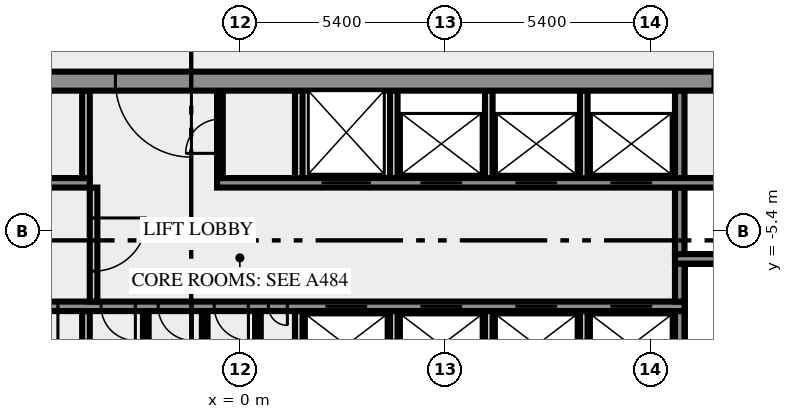
"""IFC4 building model, lengths in metres.
Left out: names, types, materials, properties, quantities, classifications, styles, units other than length and angle.
Written with IfcOpenShell. Run it as: python <this file> out.ifc"""

import sys

from ifc_helpers import new_model, si_unit, direction, frame, frame_2d, origin, place, context, subcontext, project, spatial, rectangle, extrude, element, fill, save


model = new_model("IFC4")
c1 = context("Model", 3, precision=1e-05, world=origin(), true_north=direction((0.0, 1.0)))
c2 = subcontext(c1, "Body", "Model", "MODEL_VIEW")
j1 = project(units=[si_unit("LENGTHUNIT", "METRE"), si_unit("PLANEANGLEUNIT", "RADIAN")], contexts=[c1])
p1 = place(None, origin())
s1 = spatial("IfcSite", under=j1, at=p1, CompositionType="ELEMENT")
p2 = place(p1, origin())
s2 = spatial("IfcBuilding", under=s1, at=p2, CompositionType="ELEMENT")
p3 = place(p2, frame((0.0, 0.0, 168.0)))
s3 = spatial("IfcBuildingStorey", under=s2, at=p3, CompositionType="ELEMENT", Elevation=168.0)
p4 = place(p3, frame((-4.05, -10.5, 0.0), z_axis=(0.0, 0.0, 1.0), x_axis=(0.0, 1.0, 0.0)))
e1 = element("IfcWall", 1, at=p4, inside=s3, PredefinedType="SOLIDWALL", context=c2, shape_type="SweptSolid", body=[
    extrude(rectangle(XDim=3.0, YDim=0.2, at=frame_2d((1.5, 0.0))), origin(), (0.0, 0.0, 1.0), 3.65),
])
for number, where, z_axis, x_axis in (
    (2, (-2.475, -10.5, 0.0), (0.0, 0.0, 1.0), (0.0, 1.0, 0.0)),
    (3, (-0.925, -10.5, 0.0), (0.0, 0.0, 1.0), (0.0, 1.0, 0.0)),
    (4, (0.475, -10.5, 0.0), (0.0, 0.0, 1.0), (0.0, 1.0, 0.0)),
):
    element("IfcWall", number, at=place(p3, frame(where, z_axis=z_axis, x_axis=x_axis)), inside=s3, PredefinedType="PARTITIONING", context=c2, shape_type="SweptSolid", body=[
        extrude(rectangle(XDim=3.0, YDim=0.15, at=frame_2d((1.5, 0.0))), origin(), (0.0, 0.0, 1.0), 3.65),
    ])
for number, where, z_axis, x_axis in (
    (5, (1.55, -10.5, 0.0), (0.0, 0.0, 1.0), (0.0, 1.0, 0.0)),
    (6, (4.05, -10.5, 0.0), (0.0, 0.0, 1.0), (0.0, 1.0, 0.0)),
    (7, (6.55, -10.5, 0.0), (0.0, 0.0, 1.0), (0.0, 1.0, 0.0)),
    (8, (9.05, -10.5, 0.0), (0.0, 0.0, 1.0), (0.0, 1.0, 0.0)),
):
    element("IfcWall", number, at=place(p3, frame(where, z_axis=z_axis, x_axis=x_axis)), inside=s3, PredefinedType="SOLIDWALL", context=c2, shape_type="SweptSolid", body=[
        extrude(rectangle(XDim=3.0, YDim=0.2, at=frame_2d((1.5, 0.0))), origin(), (0.0, 0.0, 1.0), 3.65),
    ])
p5 = place(p3, frame((11.575, -10.5, 0.0), z_axis=(0.0, 0.0, 1.0), x_axis=(0.0, 1.0, 0.0)))
e9 = element("IfcWall", 9, at=p5, inside=s3, PredefinedType="SHEAR", context=c2, shape_type="SweptSolid", body=[
    extrude(rectangle(XDim=3.0, YDim=0.25, at=frame_2d((1.5, 0.0))), origin(), (0.0, 0.0, 1.0), 3.65),
])
p6 = place(p3, frame((11.7, -7.375, 0.0), z_axis=(0.0, 0.0, 1.0), x_axis=(-1.0, 0.0, 0.0)))
e10 = element("IfcWall", 10, at=p6, inside=s3, PredefinedType="SHEAR", context=c2, shape_type="SweptSolid", body=[
    extrude(rectangle(XDim=23.4, YDim=0.25, at=frame_2d((11.7, 0.0))), origin(), (0.0, 0.0, 1.0), 3.65),
])
p7 = place(p6, frame((20.213, 0.0, 0.0)))
e11 = element("IfcOpeningElement", 11, at=p7, cuts=e10, PredefinedType="OPENING", context=c2, shape_type="SweptSolid", body=[
    extrude(rectangle(XDim=0.9, YDim=2.1, at=frame_2d((0.45, 1.05))), frame((0.0, 0.135, 0.0), z_axis=(0.0, -1.0, 0.0), x_axis=(1.0, 0.0, 0.0)), (0.0, 0.0, 1.0), 0.27),
])
p8 = place(p6, frame((16.488, 0.0, 0.0)))
e12 = element("IfcOpeningElement", 12, at=p8, cuts=e10, PredefinedType="OPENING", context=c2, shape_type="SweptSolid", body=[
    extrude(rectangle(XDim=0.9, YDim=2.1, at=frame_2d((0.45, 1.05))), frame((0.0, 0.135, 0.0), z_axis=(0.0, -1.0, 0.0), x_axis=(1.0, 0.0, 0.0)), (0.0, 0.0, 1.0), 0.27),
])
p9 = place(p6, frame((14.45, 0.0, 0.0)))
e13 = element("IfcOpeningElement", 13, at=p9, cuts=e10, PredefinedType="OPENING", context=c2, shape_type="SweptSolid", body=[
    extrude(rectangle(XDim=0.9, YDim=2.1, at=frame_2d((0.45, 1.05))), frame((0.0, 0.135, 0.0), z_axis=(0.0, -1.0, 0.0), x_axis=(1.0, 0.0, 0.0)), (0.0, 0.0, 1.0), 0.27),
])
p10 = place(p6, frame((12.95, 0.0, 0.0)))
e14 = element("IfcOpeningElement", 14, at=p10, cuts=e10, PredefinedType="OPENING", context=c2, shape_type="SweptSolid", body=[
    extrude(rectangle(XDim=0.9, YDim=2.1, at=frame_2d((0.45, 1.05))), frame((0.0, 0.135, 0.0), z_axis=(0.0, -1.0, 0.0), x_axis=(1.0, 0.0, 0.0)), (0.0, 0.0, 1.0), 0.27),
])
p11 = place(p6, frame((11.475, 0.0, 0.0)))
e15 = element("IfcOpeningElement", 15, at=p11, cuts=e10, PredefinedType="OPENING", context=c2, shape_type="SweptSolid", body=[
    extrude(rectangle(XDim=0.9, YDim=2.1, at=frame_2d((0.45, 1.05))), frame((0.0, 0.135, 0.0), z_axis=(0.0, -1.0, 0.0), x_axis=(1.0, 0.0, 0.0)), (0.0, 0.0, 1.0), 0.27),
])
p12 = place(p6, frame((10.45, 0.0, 0.0)))
e16 = element("IfcOpeningElement", 16, at=p12, cuts=e10, PredefinedType="OPENING", context=c2, shape_type="SweptSolid", body=[
    extrude(rectangle(XDim=0.5, YDim=2.1, at=frame_2d((0.25, 1.05))), frame((0.0, 0.135, 0.0), z_axis=(0.0, -1.0, 0.0), x_axis=(1.0, 0.0, 0.0)), (0.0, 0.0, 1.0), 0.27),
])
p13 = place(p6, frame((8.35, 0.0, 0.0)))
e17 = element("IfcOpeningElement", 17, at=p13, cuts=e10, PredefinedType="OPENING", context=c2, shape_type="SweptSolid", body=[
    extrude(rectangle(XDim=1.1, YDim=2.1, at=frame_2d((0.55, 1.05))), frame((0.0, 0.135, 0.0), z_axis=(0.0, -1.0, 0.0), x_axis=(1.0, 0.0, 0.0)), (0.0, 0.0, 1.0), 0.27),
])
p14 = place(p6, frame((5.85, 0.0, 0.0)))
e18 = element("IfcOpeningElement", 18, at=p14, cuts=e10, PredefinedType="OPENING", context=c2, shape_type="SweptSolid", body=[
    extrude(rectangle(XDim=1.1, YDim=2.1, at=frame_2d((0.55, 1.05))), frame((0.0, 0.135, 0.0), z_axis=(0.0, -1.0, 0.0), x_axis=(1.0, 0.0, 0.0)), (0.0, 0.0, 1.0), 0.27),
])
p15 = place(p6, frame((3.35, 0.0, 0.0)))
e19 = element("IfcOpeningElement", 19, at=p15, cuts=e10, PredefinedType="OPENING", context=c2, shape_type="SweptSolid", body=[
    extrude(rectangle(XDim=1.1, YDim=2.1, at=frame_2d((0.55, 1.05))), frame((0.0, 0.135, 0.0), z_axis=(0.0, -1.0, 0.0), x_axis=(1.0, 0.0, 0.0)), (0.0, 0.0, 1.0), 0.27),
])
p16 = place(p6, frame((0.85, 0.0, 0.0)))
e20 = element("IfcOpeningElement", 20, at=p16, cuts=e10, PredefinedType="OPENING", context=c2, shape_type="SweptSolid", body=[
    extrude(rectangle(XDim=1.1, YDim=2.1, at=frame_2d((0.55, 1.05))), frame((0.0, 0.135, 0.0), z_axis=(0.0, -1.0, 0.0), x_axis=(1.0, 0.0, 0.0)), (0.0, 0.0, 1.0), 0.27),
])
p17 = place(p3, frame((-3.85, -4.25, 0.0), z_axis=(0.0, 0.0, 1.0), x_axis=(0.0, -1.0, 0.0)))
e21 = element("IfcWall", 21, at=p17, inside=s3, PredefinedType="SOLIDWALL", context=c2, shape_type="SweptSolid", body=[
    extrude(rectangle(XDim=3.0, YDim=0.2, at=frame_2d((1.5, 0.0))), origin(), (0.0, 0.0, 1.0), 3.65),
])
p18 = place(p17, frame((0.8, 0.0, 0.0)))
e22 = element("IfcOpeningElement", 22, at=p18, cuts=e21, PredefinedType="OPENING", context=c2, shape_type="SweptSolid", body=[
    extrude(rectangle(XDim=1.4, YDim=2.1, at=frame_2d((0.7, 1.05))), frame((0.0, 0.11, 0.0), z_axis=(0.0, -1.0, 0.0), x_axis=(1.0, 0.0, 0.0)), (0.0, 0.0, 1.0), 0.22),
])
p19 = place(p3, frame((11.575, -7.25, 0.0), z_axis=(0.0, 0.0, 1.0), x_axis=(0.0, 1.0, 0.0)))
e23 = element("IfcWall", 23, at=p19, inside=s3, PredefinedType="SHEAR", context=c2, shape_type="SweptSolid", body=[
    extrude(rectangle(XDim=1.0, YDim=0.25, at=frame_2d((0.5, 0.0))), origin(), (0.0, 0.0, 1.0), 3.65),
])
p20 = place(p3, frame((19.5, -6.125, 0.0), z_axis=(0.0, 0.0, 1.0), x_axis=(-1.0, 0.0, 0.0)))
e24 = element("IfcWall", 24, at=p20, inside=s3, PredefinedType="SHEAR", context=c2, shape_type="SweptSolid", body=[
    extrude(rectangle(XDim=8.05, YDim=0.25, at=frame_2d((4.025, 0.0))), origin(), (0.0, 0.0, 1.0), 3.65),
])
p21 = place(p20, frame((0.05, 0.0, 0.0)))
e25 = element("IfcOpeningElement", 25, at=p21, cuts=e24, PredefinedType="OPENING", context=c2, shape_type="SweptSolid", body=[
    extrude(rectangle(XDim=1.8, YDim=2.1, at=frame_2d((0.9, 1.05))), frame((0.0, 0.135, 0.0), z_axis=(0.0, -1.0, 0.0), x_axis=(1.0, 0.0, 0.0)), (0.0, 0.0, 1.0), 0.27),
])
p22 = place(p3, frame((11.575, -6.0, 0.0), z_axis=(0.0, 0.0, 1.0), x_axis=(0.0, 1.0, 0.0)))
e26 = element("IfcWall", 26, at=p22, inside=s3, PredefinedType="SHEAR", context=c2, shape_type="SweptSolid", body=[
    extrude(rectangle(XDim=1.75, YDim=0.25, at=frame_2d((0.875, 0.0))), origin(), (0.0, 0.0, 1.0), 3.65),
])
p23 = place(p3, frame((-14.35, -4.125, 0.0), z_axis=(0.0, 0.0, 1.0), x_axis=(1.0, 0.0, 0.0)))
e27 = element("IfcWall", 27, at=p23, inside=s3, PredefinedType="SHEAR", context=c2, shape_type="SweptSolid", body=[
    extrude(rectangle(XDim=10.4, YDim=0.25, at=frame_2d((5.2, 0.0))), origin(), (0.0, 0.0, 1.0), 3.65),
])
p24 = place(p3, frame((-0.6, -4.125, 0.0), z_axis=(0.0, 0.0, 1.0), x_axis=(1.0, 0.0, 0.0)))
e28 = element("IfcWall", 28, at=p24, inside=s3, PredefinedType="SHEAR", context=c2, shape_type="SweptSolid", body=[
    extrude(rectangle(XDim=14.95, YDim=0.25, at=frame_2d((7.475, 0.0))), origin(), (0.0, 0.0, 1.0), 3.65),
])
p25 = place(p24, frame((2.75, 0.0, 0.0)))
e29 = element("IfcOpeningElement", 29, at=p25, cuts=e28, PredefinedType="OPENING", context=c2, shape_type="SweptSolid", body=[
    extrude(rectangle(XDim=1.3, YDim=2.1, at=frame_2d((0.65, 1.05))), frame((0.0, 0.135, 0.0), z_axis=(0.0, -1.0, 0.0), x_axis=(1.0, 0.0, 0.0)), (0.0, 0.0, 1.0), 0.27),
])
p26 = place(p24, frame((5.35, 0.0, 0.0)))
e30 = element("IfcOpeningElement", 30, at=p26, cuts=e28, PredefinedType="OPENING", context=c2, shape_type="SweptSolid", body=[
    extrude(rectangle(XDim=1.1, YDim=2.1, at=frame_2d((0.55, 1.05))), frame((0.0, 0.135, 0.0), z_axis=(0.0, -1.0, 0.0), x_axis=(1.0, 0.0, 0.0)), (0.0, 0.0, 1.0), 0.27),
])
p27 = place(p24, frame((7.85, 0.0, 0.0)))
e31 = element("IfcOpeningElement", 31, at=p27, cuts=e28, PredefinedType="OPENING", context=c2, shape_type="SweptSolid", body=[
    extrude(rectangle(XDim=1.1, YDim=2.1, at=frame_2d((0.55, 1.05))), frame((0.0, 0.135, 0.0), z_axis=(0.0, -1.0, 0.0), x_axis=(1.0, 0.0, 0.0)), (0.0, 0.0, 1.0), 0.27),
])
p28 = place(p24, frame((10.35, 0.0, 0.0)))
e32 = element("IfcOpeningElement", 32, at=p28, cuts=e28, PredefinedType="OPENING", context=c2, shape_type="SweptSolid", body=[
    extrude(rectangle(XDim=1.1, YDim=2.1, at=frame_2d((0.55, 1.05))), frame((0.0, 0.135, 0.0), z_axis=(0.0, -1.0, 0.0), x_axis=(1.0, 0.0, 0.0)), (0.0, 0.0, 1.0), 0.27),
])
p29 = place(p3, frame((-4.05, -4.0, 0.0), z_axis=(0.0, 0.0, 1.0), x_axis=(0.0, 1.0, 0.0)))
e33 = element("IfcWall", 33, at=p29, inside=s3, PredefinedType="SOLIDWALL", context=c2, shape_type="SweptSolid", body=[
    extrude(rectangle(XDim=2.3, YDim=0.2, at=frame_2d((1.15, 0.0))), origin(), (0.0, 0.0, 1.0), 3.65),
])
p30 = place(p3, frame((-0.525, -4.0, 0.0), z_axis=(0.0, 0.0, 1.0), x_axis=(0.0, 1.0, 0.0)))
e34 = element("IfcWall", 34, at=p30, inside=s3, PredefinedType="PARTITIONING", context=c2, shape_type="SweptSolid", body=[
    extrude(rectangle(XDim=2.3, YDim=0.15, at=frame_2d((1.15, 0.0))), origin(), (0.0, 0.0, 1.0), 3.65),
])
p31 = place(p30, frame((0.65, 0.0, 0.0)))
e35 = element("IfcOpeningElement", 35, at=p31, cuts=e34, PredefinedType="OPENING", context=c2, shape_type="SweptSolid", body=[
    extrude(rectangle(XDim=0.9, YDim=2.1, at=frame_2d((0.45, 1.05))), frame((0.0, 0.085, 0.0), z_axis=(0.0, -1.0, 0.0), x_axis=(1.0, 0.0, 0.0)), (0.0, 0.0, 1.0), 0.17),
])
for number, where, z_axis, x_axis in (
    (36, (1.55, -4.0, 0.0), (0.0, 0.0, 1.0), (0.0, 1.0, 0.0)),
    (37, (4.05, -4.0, 0.0), (0.0, 0.0, 1.0), (0.0, 1.0, 0.0)),
    (38, (6.55, -4.0, 0.0), (0.0, 0.0, 1.0), (0.0, 1.0, 0.0)),
    (39, (9.05, -4.0, 0.0), (0.0, 0.0, 1.0), (0.0, 1.0, 0.0)),
):
    element("IfcWall", number, at=place(p3, frame(where, z_axis=z_axis, x_axis=x_axis)), inside=s3, PredefinedType="SOLIDWALL", context=c2, shape_type="SweptSolid", body=[
        extrude(rectangle(XDim=2.3, YDim=0.2, at=frame_2d((1.15, 0.0))), origin(), (0.0, 0.0, 1.0), 3.65),
    ])
p32 = place(p3, frame((11.575, -4.0, 0.0), z_axis=(0.0, 0.0, 1.0), x_axis=(0.0, 1.0, 0.0)))
e40 = element("IfcWall", 40, at=p32, inside=s3, PredefinedType="SHEAR", context=c2, shape_type="SweptSolid", body=[
    extrude(rectangle(XDim=2.3, YDim=0.25, at=frame_2d((1.15, 0.0))), origin(), (0.0, 0.0, 1.0), 3.65),
])
p33 = place(p3, frame((20.49, -1.45, 0.0), z_axis=(0.0, 0.0, 1.0), x_axis=(-1.0, 0.0, 0.0)))
e41 = element("IfcWall", 41, at=p33, inside=s3, PredefinedType="SHEAR", context=c2, shape_type="SweptSolid", body=[
    extrude(rectangle(XDim=40.98, YDim=0.5, at=frame_2d((20.49, 0.0))), origin(), (0.0, 0.0, 1.0), 3.65),
])
p34 = place(p33, frame((38.14, 0.0, 0.0)))
e42 = element("IfcOpeningElement", 42, at=p34, cuts=e41, PredefinedType="OPENING", context=c2, shape_type="SweptSolid", body=[
    extrude(rectangle(XDim=1.8, YDim=2.1, at=frame_2d((0.9, 1.05))), frame((0.0, 0.26, 0.0), z_axis=(0.0, -1.0, 0.0), x_axis=(1.0, 0.0, 0.0)), (0.0, 0.0, 1.0), 0.52),
])
p35 = place(p33, frame((36.728, 0.0, 0.0)))
e43 = element("IfcOpeningElement", 43, at=p35, cuts=e41, PredefinedType="OPENING", context=c2, shape_type="SweptSolid", body=[
    extrude(rectangle(XDim=0.8, YDim=2.1, at=frame_2d((0.4, 1.05))), frame((0.0, 0.26, 0.0), z_axis=(0.0, -1.0, 0.0), x_axis=(1.0, 0.0, 0.0)), (0.0, 0.0, 1.0), 0.52),
])
p36 = place(p33, frame((35.153, 0.0, 0.0)))
e44 = element("IfcOpeningElement", 44, at=p36, cuts=e41, PredefinedType="OPENING", context=c2, shape_type="SweptSolid", body=[
    extrude(rectangle(XDim=0.8, YDim=2.1, at=frame_2d((0.4, 1.05))), frame((0.0, 0.26, 0.0), z_axis=(0.0, -1.0, 0.0), x_axis=(1.0, 0.0, 0.0)), (0.0, 0.0, 1.0), 0.52),
])
p37 = place(p33, frame((32.94, 0.0, 0.0)))
e45 = element("IfcOpeningElement", 45, at=p37, cuts=e41, PredefinedType="OPENING", context=c2, shape_type="SweptSolid", body=[
    extrude(rectangle(XDim=0.9, YDim=2.1, at=frame_2d((0.45, 1.05))), frame((0.0, 0.26, 0.0), z_axis=(0.0, -1.0, 0.0), x_axis=(1.0, 0.0, 0.0)), (0.0, 0.0, 1.0), 0.52),
])
p38 = place(p33, frame((27.84, 0.0, 0.0)))
e46 = element("IfcOpeningElement", 46, at=p38, cuts=e41, PredefinedType="OPENING", context=c2, shape_type="SweptSolid", body=[
    extrude(rectangle(XDim=0.9, YDim=2.1, at=frame_2d((0.45, 1.05))), frame((0.0, 0.26, 0.0), z_axis=(0.0, -1.0, 0.0), x_axis=(1.0, 0.0, 0.0)), (0.0, 0.0, 1.0), 0.52),
])
p39 = place(p33, frame((21.765, 0.0, 0.0)))
e47 = element("IfcOpeningElement", 47, at=p39, cuts=e41, PredefinedType="OPENING", context=c2, shape_type="SweptSolid", body=[
    extrude(rectangle(XDim=2.0, YDim=2.1, at=frame_2d((1.0, 1.05))), frame((0.0, 0.26, 0.0), z_axis=(0.0, -1.0, 0.0), x_axis=(1.0, 0.0, 0.0)), (0.0, 0.0, 1.0), 0.52),
])
p40 = place(p33, frame((7.14, 0.0, 0.0)))
e48 = element("IfcOpeningElement", 48, at=p40, cuts=e41, PredefinedType="OPENING", context=c2, shape_type="SweptSolid", body=[
    extrude(rectangle(XDim=0.9, YDim=2.1, at=frame_2d((0.45, 1.05))), frame((0.0, 0.26, 0.0), z_axis=(0.0, -1.0, 0.0), x_axis=(1.0, 0.0, 0.0)), (0.0, 0.0, 1.0), 0.52),
])
p41 = place(p33, frame((4.19, 0.0, 0.0)))
e49 = element("IfcOpeningElement", 49, at=p41, cuts=e41, PredefinedType="OPENING", context=c2, shape_type="SweptSolid", body=[
    extrude(rectangle(XDim=0.9, YDim=2.1, at=frame_2d((0.45, 1.05))), frame((0.0, 0.26, 0.0), z_axis=(0.0, -1.0, 0.0), x_axis=(1.0, 0.0, 0.0)), (0.0, 0.0, 1.0), 0.52),
])
p42 = place(p33, frame((1.04, 0.0, 0.0)))
e50 = element("IfcOpeningElement", 50, at=p42, cuts=e41, PredefinedType="OPENING", context=c2, shape_type="SweptSolid", body=[
    extrude(rectangle(XDim=1.8, YDim=2.1, at=frame_2d((0.9, 1.05))), frame((0.0, 0.26, 0.0), z_axis=(0.0, -1.0, 0.0), x_axis=(1.0, 0.0, 0.0)), (0.0, 0.0, 1.0), 0.52),
])
p43 = place(p8, origin())
e51 = element("IfcDoor", 51, at=p43, inside=s3, OperationType="SINGLE_SWING_RIGHT", PredefinedType="DOOR", context=c2, shape_type="SweptSolid", body=[
    extrude(rectangle(XDim=0.9, YDim=2.1, at=frame_2d((0.45, 1.05))), frame((0.0, 0.025, 0.0), z_axis=(0.0, -1.0, 0.0), x_axis=(1.0, 0.0, 0.0)), (0.0, 0.0, 1.0), 0.05),
])
fill(e12, e51)
p44 = place(p9, origin())
e52 = element("IfcDoor", 52, at=p44, inside=s3, OperationType="SINGLE_SWING_RIGHT", PredefinedType="DOOR", context=c2, shape_type="SweptSolid", body=[
    extrude(rectangle(XDim=0.9, YDim=2.1, at=frame_2d((0.45, 1.05))), frame((0.0, 0.025, 0.0), z_axis=(0.0, -1.0, 0.0), x_axis=(1.0, 0.0, 0.0)), (0.0, 0.0, 1.0), 0.05),
])
fill(e13, e52)
p45 = place(p10, origin())
e53 = element("IfcDoor", 53, at=p45, inside=s3, OperationType="SINGLE_SWING_RIGHT", PredefinedType="DOOR", context=c2, shape_type="SweptSolid", body=[
    extrude(rectangle(XDim=0.9, YDim=2.1, at=frame_2d((0.45, 1.05))), frame((0.0, 0.025, 0.0), z_axis=(0.0, -1.0, 0.0), x_axis=(1.0, 0.0, 0.0)), (0.0, 0.0, 1.0), 0.05),
])
fill(e14, e53)
p46 = place(p11, origin())
e54 = element("IfcDoor", 54, at=p46, inside=s3, OperationType="SINGLE_SWING_RIGHT", PredefinedType="DOOR", context=c2, shape_type="SweptSolid", body=[
    extrude(rectangle(XDim=0.9, YDim=2.1, at=frame_2d((0.45, 1.05))), frame((0.0, 0.025, 0.0), z_axis=(0.0, -1.0, 0.0), x_axis=(1.0, 0.0, 0.0)), (0.0, 0.0, 1.0), 0.05),
])
fill(e15, e54)
p47 = place(p12, origin())
e55 = element("IfcDoor", 55, at=p47, inside=s3, OperationType="SINGLE_SWING_LEFT", PredefinedType="DOOR", context=c2, shape_type="SweptSolid", body=[
    extrude(rectangle(XDim=0.5, YDim=2.1, at=frame_2d((0.25, 1.05))), frame((0.0, 0.025, 0.0), z_axis=(0.0, -1.0, 0.0), x_axis=(1.0, 0.0, 0.0)), (0.0, 0.0, 1.0), 0.05),
])
fill(e16, e55)
p48 = place(p13, origin())
e56 = element("IfcDoor", 56, at=p48, inside=s3, OperationType="DOUBLE_DOOR_SLIDING", PredefinedType="DOOR", context=c2, shape_type="SweptSolid", body=[
    extrude(rectangle(XDim=1.1, YDim=2.1, at=frame_2d((0.55, 1.05))), frame((0.0, 0.025, 0.0), z_axis=(0.0, -1.0, 0.0), x_axis=(1.0, 0.0, 0.0)), (0.0, 0.0, 1.0), 0.05),
])
fill(e17, e56)
p49 = place(p14, origin())
e57 = element("IfcDoor", 57, at=p49, inside=s3, OperationType="DOUBLE_DOOR_SLIDING", PredefinedType="DOOR", context=c2, shape_type="SweptSolid", body=[
    extrude(rectangle(XDim=1.1, YDim=2.1, at=frame_2d((0.55, 1.05))), frame((0.0, 0.025, 0.0), z_axis=(0.0, -1.0, 0.0), x_axis=(1.0, 0.0, 0.0)), (0.0, 0.0, 1.0), 0.05),
])
fill(e18, e57)
p50 = place(p15, origin())
e58 = element("IfcDoor", 58, at=p50, inside=s3, OperationType="DOUBLE_DOOR_SLIDING", PredefinedType="DOOR", context=c2, shape_type="SweptSolid", body=[
    extrude(rectangle(XDim=1.1, YDim=2.1, at=frame_2d((0.55, 1.05))), frame((0.0, 0.025, 0.0), z_axis=(0.0, -1.0, 0.0), x_axis=(1.0, 0.0, 0.0)), (0.0, 0.0, 1.0), 0.05),
])
fill(e19, e58)
p51 = place(p16, origin())
e59 = element("IfcDoor", 59, at=p51, inside=s3, OperationType="DOUBLE_DOOR_SLIDING", PredefinedType="DOOR", context=c2, shape_type="SweptSolid", body=[
    extrude(rectangle(XDim=1.1, YDim=2.1, at=frame_2d((0.55, 1.05))), frame((0.0, 0.025, 0.0), z_axis=(0.0, -1.0, 0.0), x_axis=(1.0, 0.0, 0.0)), (0.0, 0.0, 1.0), 0.05),
])
fill(e20, e59)
p52 = place(p18, origin())
e60 = element("IfcDoor", 60, at=p52, inside=s3, OperationType="DOUBLE_DOOR_SINGLE_SWING", PredefinedType="DOOR", context=c2, shape_type="SweptSolid", body=[
    extrude(rectangle(XDim=1.4, YDim=2.1, at=frame_2d((0.7, 1.05))), frame((0.0, 0.025, 0.0), z_axis=(0.0, -1.0, 0.0), x_axis=(1.0, 0.0, 0.0)), (0.0, 0.0, 1.0), 0.05),
])
fill(e22, e60)
p53 = place(p25, origin())
e61 = element("IfcDoor", 61, at=p53, inside=s3, OperationType="DOUBLE_DOOR_SLIDING", PredefinedType="DOOR", context=c2, shape_type="SweptSolid", body=[
    extrude(rectangle(XDim=1.3, YDim=2.1, at=frame_2d((0.65, 1.05))), frame((0.0, 0.025, 0.0), z_axis=(0.0, -1.0, 0.0), x_axis=(1.0, 0.0, 0.0)), (0.0, 0.0, 1.0), 0.05),
])
fill(e29, e61)
p54 = place(p26, origin())
e62 = element("IfcDoor", 62, at=p54, inside=s3, OperationType="DOUBLE_DOOR_SLIDING", PredefinedType="DOOR", context=c2, shape_type="SweptSolid", body=[
    extrude(rectangle(XDim=1.1, YDim=2.1, at=frame_2d((0.55, 1.05))), frame((0.0, 0.025, 0.0), z_axis=(0.0, -1.0, 0.0), x_axis=(1.0, 0.0, 0.0)), (0.0, 0.0, 1.0), 0.05),
])
fill(e30, e62)
p55 = place(p27, origin())
e63 = element("IfcDoor", 63, at=p55, inside=s3, OperationType="DOUBLE_DOOR_SLIDING", PredefinedType="DOOR", context=c2, shape_type="SweptSolid", body=[
    extrude(rectangle(XDim=1.1, YDim=2.1, at=frame_2d((0.55, 1.05))), frame((0.0, 0.025, 0.0), z_axis=(0.0, -1.0, 0.0), x_axis=(1.0, 0.0, 0.0)), (0.0, 0.0, 1.0), 0.05),
])
fill(e31, e63)
p56 = place(p28, origin())
e64 = element("IfcDoor", 64, at=p56, inside=s3, OperationType="DOUBLE_DOOR_SLIDING", PredefinedType="DOOR", context=c2, shape_type="SweptSolid", body=[
    extrude(rectangle(XDim=1.1, YDim=2.1, at=frame_2d((0.55, 1.05))), frame((0.0, 0.025, 0.0), z_axis=(0.0, -1.0, 0.0), x_axis=(1.0, 0.0, 0.0)), (0.0, 0.0, 1.0), 0.05),
])
fill(e32, e64)
p57 = place(p31, origin())
e65 = element("IfcDoor", 65, at=p57, inside=s3, OperationType="SINGLE_SWING_LEFT", PredefinedType="DOOR", context=c2, shape_type="SweptSolid", body=[
    extrude(rectangle(XDim=0.9, YDim=2.1, at=frame_2d((0.45, 1.05))), frame((0.0, 0.025, 0.0), z_axis=(0.0, -1.0, 0.0), x_axis=(1.0, 0.0, 0.0)), (0.0, 0.0, 1.0), 0.05),
])
fill(e35, e65)
p58 = place(p39, origin())
e66 = element("IfcDoor", 66, at=p58, inside=s3, OperationType="DOUBLE_DOOR_SINGLE_SWING", PredefinedType="DOOR", context=c2, shape_type="SweptSolid", body=[
    extrude(rectangle(XDim=2.0, YDim=2.1, at=frame_2d((1.0, 1.05))), frame((0.0, 0.025, 0.0), z_axis=(0.0, -1.0, 0.0), x_axis=(1.0, 0.0, 0.0)), (0.0, 0.0, 1.0), 0.05),
])
fill(e47, e66)
save(model, sys.argv[1])
